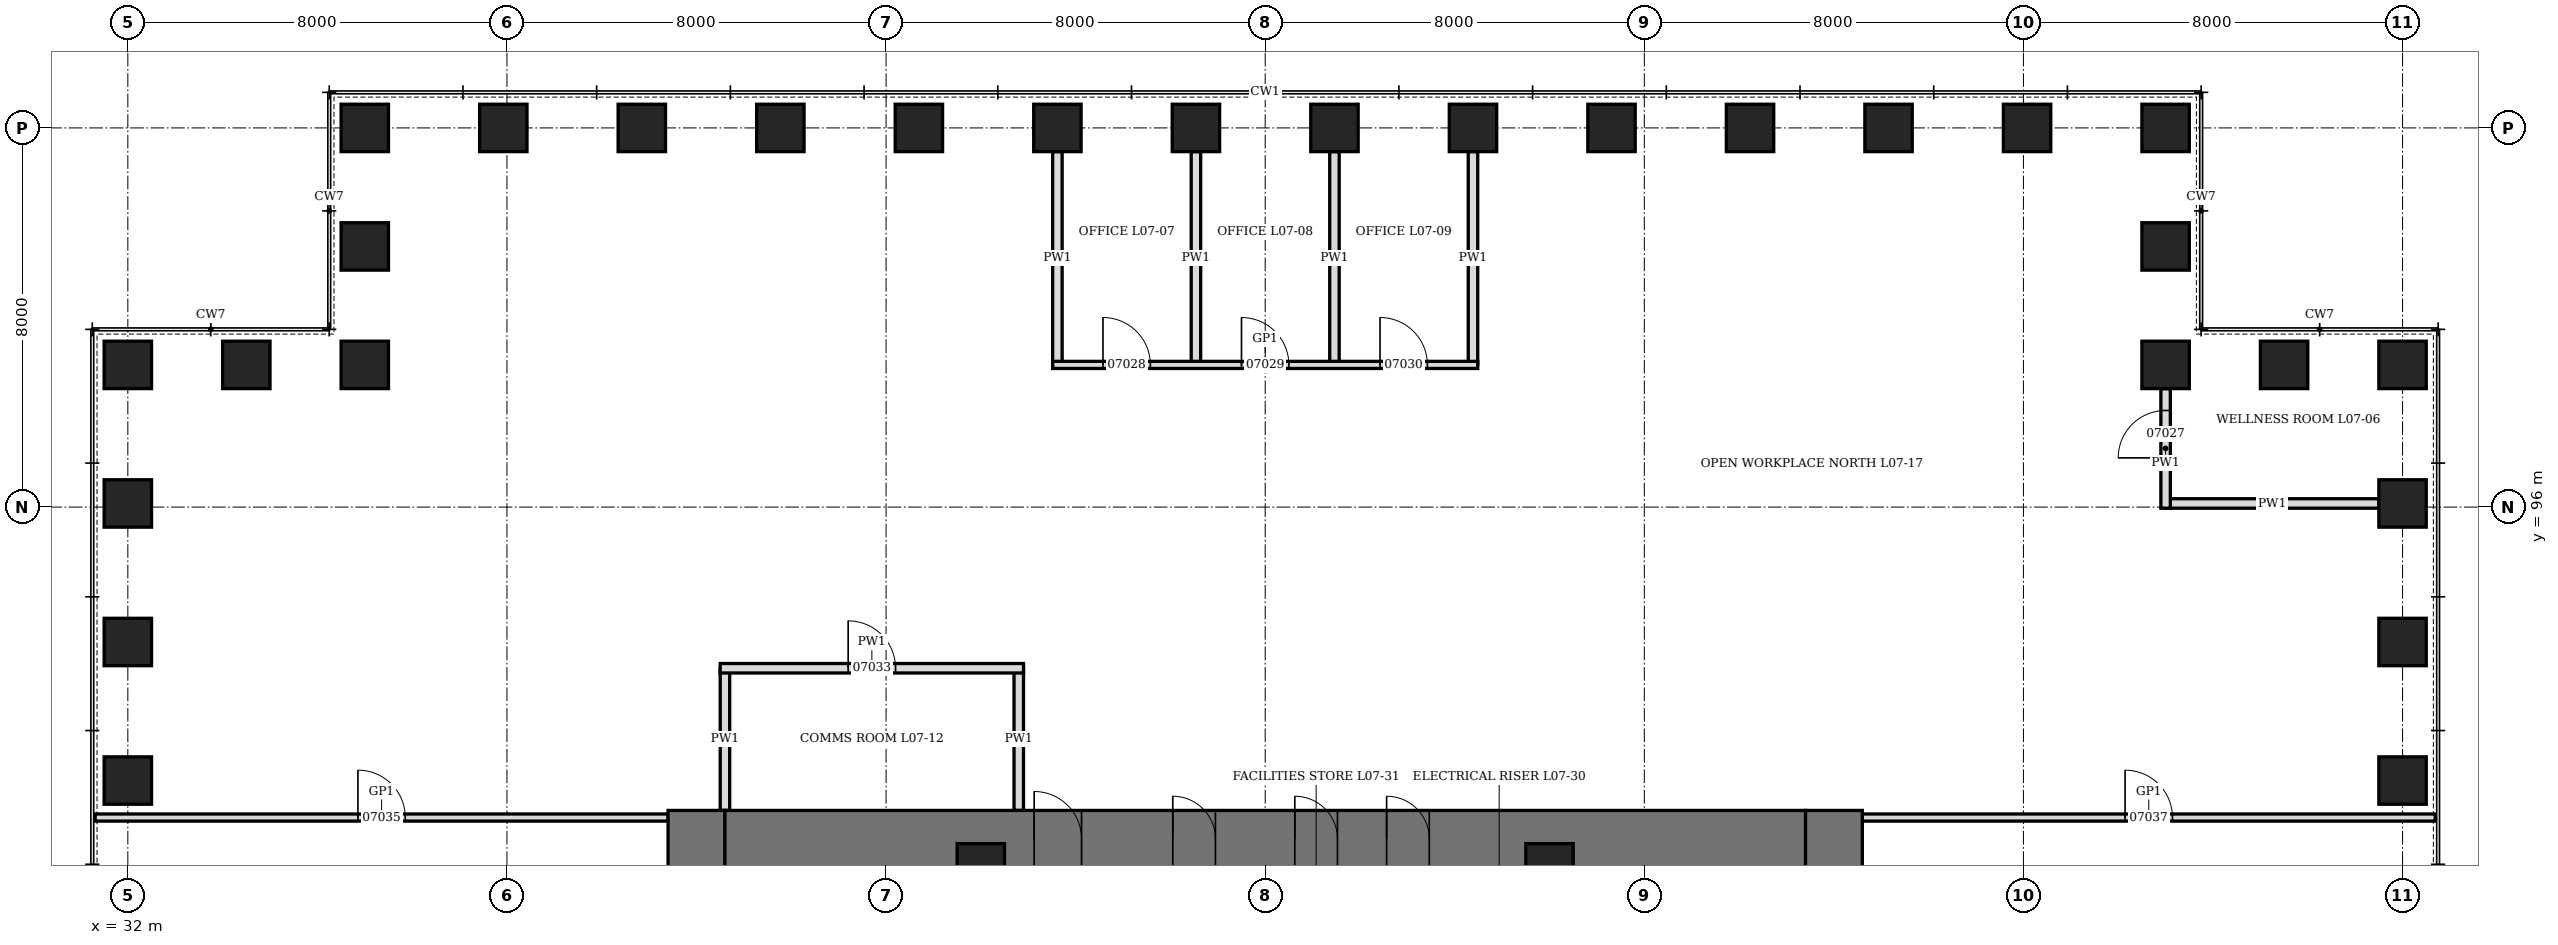
"""IFC4 building model, lengths in metres.
Left out: names, types, materials, properties, quantities, classifications, styles, units other than length and angle.
Written with IfcOpenShell. Run it as: python <this file> out.ifc"""

import sys

from ifc_helpers import new_model, si_unit, direction, frame, frame_2d, origin, origin_2d, place, context, subcontext, project, spatial, rectangle, hollow_rectangle, extrude, element, fill, save


model = new_model("IFC4")
c1 = context("Model", 3, precision=1e-05, world=origin(), true_north=direction((0.0, 1.0)))
c2 = subcontext(c1, "Body", "Model", "MODEL_VIEW")
j1 = project(units=[si_unit("LENGTHUNIT", "METRE"), si_unit("PLANEANGLEUNIT", "RADIAN")], contexts=[c1])
p1 = place(None, origin())
s1 = spatial("IfcSite", under=j1, at=p1, CompositionType="ELEMENT")
p2 = place(p1, origin())
s2 = spatial("IfcBuilding", under=s1, at=p2, CompositionType="ELEMENT")
p3 = place(p2, frame((0.0, 0.0, 39.1)))
s3 = spatial("IfcBuildingStorey", under=s2, at=p3, CompositionType="ELEMENT", Elevation=39.1)
for number, where, z_axis, x_axis in (
    (1, (80.0, 90.231, 0.0), (0.0, 0.0, 1.0), (0.0, 1.0, 0.0)),
    (2, (80.0, 93.154, 0.0), (0.0, 0.0, 1.0), (0.0, 1.0, 0.0)),
    (3, (80.0, 96.077, 0.0), (0.0, 0.0, 1.0), (0.0, 1.0, 0.0)),
    (4, (80.0, 99.0, 0.0), (0.0, 0.0, 1.0), (1.0, 0.0, 0.0)),
    (5, (77.5, 99.0, 0.0), (0.0, 0.0, 1.0), (1.0, 0.0, 0.0)),
    (6, (75.0, 99.0, 0.0), (0.0, 0.0, 1.0), (0.0, 1.0, 0.0)),
    (7, (75.0, 101.5, 0.0), (0.0, 0.0, 1.0), (0.0, 1.0, 0.0)),
    (8, (75.0, 104.0, 0.0), (0.0, 0.0, 1.0), (1.0, 0.0, 0.0)),
    (9, (72.077, 104.0, 0.0), (0.0, 0.0, 1.0), (1.0, 0.0, 0.0)),
    (10, (69.154, 104.0, 0.0), (0.0, 0.0, 1.0), (1.0, 0.0, 0.0)),
    (11, (66.231, 104.0, 0.0), (0.0, 0.0, 1.0), (1.0, 0.0, 0.0)),
    (12, (63.308, 104.0, 0.0), (0.0, 0.0, 1.0), (1.0, 0.0, 0.0)),
    (13, (60.385, 104.0, 0.0), (0.0, 0.0, 1.0), (1.0, 0.0, 0.0)),
    (14, (57.461, 104.0, 0.0), (0.0, 0.0, 1.0), (1.0, 0.0, 0.0)),
    (15, (54.539, 104.0, 0.0), (0.0, 0.0, 1.0), (1.0, 0.0, 0.0)),
    (16, (51.615, 104.0, 0.0), (0.0, 0.0, 1.0), (1.0, 0.0, 0.0)),
    (17, (48.692, 104.0, 0.0), (0.0, 0.0, 1.0), (1.0, 0.0, 0.0)),
    (18, (45.769, 104.0, 0.0), (0.0, 0.0, 1.0), (1.0, 0.0, 0.0)),
    (19, (42.846, 104.0, 0.0), (0.0, 0.0, 1.0), (1.0, 0.0, 0.0)),
    (20, (39.923, 104.0, 0.0), (0.0, 0.0, 1.0), (1.0, 0.0, 0.0)),
    (21, (37.0, 104.0, 0.0), (0.0, 0.0, 1.0), (0.0, 1.0, 0.0)),
    (22, (37.0, 101.5, 0.0), (0.0, 0.0, 1.0), (0.0, 1.0, 0.0)),
    (23, (37.0, 99.0, 0.0), (0.0, 0.0, 1.0), (1.0, 0.0, 0.0)),
    (24, (34.5, 99.0, 0.0), (0.0, 0.0, 1.0), (1.0, 0.0, 0.0)),
    (25, (32.0, 99.0, 0.0), (0.0, 0.0, 1.0), (0.0, 1.0, 0.0)),
    (26, (32.0, 96.077, 0.0), (0.0, 0.0, 1.0), (0.0, 1.0, 0.0)),
    (27, (32.0, 93.154, 0.0), (0.0, 0.0, 1.0), (0.0, 1.0, 0.0)),
    (28, (32.0, 90.231, 0.0), (0.0, 0.0, 1.0), (0.0, 1.0, 0.0)),
):
    element("IfcColumn", number, at=place(p3, frame(where, z_axis=z_axis, x_axis=x_axis)), inside=s3, PredefinedType="COLUMN", context=c2, shape_type="SweptSolid", body=[
        extrude(hollow_rectangle(XDim=1.0, YDim=1.0, WallThickness=0.35, at=origin_2d()), origin(), (0.0, 0.0, 1.0), 4.2),
    ])
p4 = place(p3, frame((44.0, 70.4, 0.0), z_axis=(0.0, 0.0, 1.0), x_axis=(0.0, 1.0, 0.0)))
e29 = element("IfcWall", 29, at=p4, inside=s3, PredefinedType="SHEAR", context=c2, shape_type="SweptSolid", body=[
    extrude(rectangle(XDim=19.2, YDim=1.2, at=frame_2d((9.6, 0.0))), origin(), (0.0, 0.0, 1.0), 4.2),
])
p5 = place(p4, frame((8.6, 0.0, 0.0)))
e30 = element("IfcOpeningElement", 30, at=p5, cuts=e29, PredefinedType="OPENING", context=c2, shape_type="SweptSolid", body=[
    extrude(rectangle(XDim=2.0, YDim=2.4, at=frame_2d((1.0, 1.2))), frame((0.0, 0.61, 0.0), z_axis=(0.0, -1.0, 0.0), x_axis=(1.0, 0.0, 0.0)), (0.0, 0.0, 1.0), 1.22),
])
p6 = place(p3, frame((68.0, 70.4, 0.0), z_axis=(0.0, 0.0, 1.0), x_axis=(0.0, 1.0, 0.0)))
e31 = element("IfcWall", 31, at=p6, inside=s3, PredefinedType="SHEAR", context=c2, shape_type="SweptSolid", body=[
    extrude(rectangle(XDim=19.2, YDim=1.2, at=frame_2d((9.6, 0.0))), origin(), (0.0, 0.0, 1.0), 4.2),
])
p7 = place(p6, frame((8.6, 0.0, 0.0)))
e32 = element("IfcOpeningElement", 32, at=p7, cuts=e31, PredefinedType="OPENING", context=c2, shape_type="SweptSolid", body=[
    extrude(rectangle(XDim=2.0, YDim=2.4, at=frame_2d((1.0, 1.2))), frame((0.0, 0.61, 0.0), z_axis=(0.0, -1.0, 0.0), x_axis=(1.0, 0.0, 0.0)), (0.0, 0.0, 1.0), 1.22),
])
p8 = place(p3, frame((44.6, 89.0, 0.0), z_axis=(0.0, 0.0, 1.0), x_axis=(1.0, 0.0, 0.0)))
e33 = element("IfcWall", 33, at=p8, inside=s3, PredefinedType="SHEAR", context=c2, shape_type="SweptSolid", body=[
    extrude(rectangle(XDim=22.8, YDim=1.2, at=frame_2d((11.4, 0.0))), origin(), (0.0, 0.0, 1.0), 4.2),
])
p9 = place(p8, frame((6.525, 0.0, 0.0)))
e34 = element("IfcOpeningElement", 34, at=p9, cuts=e33, PredefinedType="OPENING", context=c2, shape_type="SweptSolid", body=[
    extrude(rectangle(XDim=1.0, YDim=2.1, at=frame_2d((0.5, 1.05))), frame((0.0, 0.61, 0.0), z_axis=(0.0, -1.0, 0.0), x_axis=(1.0, 0.0, 0.0)), (0.0, 0.0, 1.0), 1.22),
])
p10 = place(p8, frame((9.45, 0.0, 0.0)))
e35 = element("IfcOpeningElement", 35, at=p10, cuts=e33, PredefinedType="OPENING", context=c2, shape_type="SweptSolid", body=[
    extrude(rectangle(XDim=0.9, YDim=2.1, at=frame_2d((0.45, 1.05))), frame((0.0, 0.61, 0.0), z_axis=(0.0, -1.0, 0.0), x_axis=(1.0, 0.0, 0.0)), (0.0, 0.0, 1.0), 1.22),
])
p11 = place(p8, frame((12.025, 0.0, 0.0)))
e36 = element("IfcOpeningElement", 36, at=p11, cuts=e33, PredefinedType="OPENING", context=c2, shape_type="SweptSolid", body=[
    extrude(rectangle(XDim=0.9, YDim=2.1, at=frame_2d((0.45, 1.05))), frame((0.0, 0.61, 0.0), z_axis=(0.0, -1.0, 0.0), x_axis=(1.0, 0.0, 0.0)), (0.0, 0.0, 1.0), 1.22),
])
p12 = place(p8, frame((13.962, 0.0, 0.0)))
e37 = element("IfcOpeningElement", 37, at=p12, cuts=e33, PredefinedType="OPENING", context=c2, shape_type="SweptSolid", body=[
    extrude(rectangle(XDim=0.9, YDim=2.1, at=frame_2d((0.45, 1.05))), frame((0.0, 0.61, 0.0), z_axis=(0.0, -1.0, 0.0), x_axis=(1.0, 0.0, 0.0)), (0.0, 0.0, 1.0), 1.22),
])
for number, where, z_axis, x_axis in (
    (38, (50.0, 88.4, 0.0), (0.0, 0.0, 1.0), (1.0, 0.0, 0.0)),
    (39, (62.0, 88.4, 0.0), (0.0, 0.0, 1.0), (1.0, 0.0, 0.0)),
):
    element("IfcColumn", number, at=place(p3, frame(where, z_axis=z_axis, x_axis=x_axis)), inside=s3, PredefinedType="COLUMN", context=c2, shape_type="SweptSolid", body=[
        extrude(hollow_rectangle(XDim=1.0, YDim=1.0, WallThickness=0.15, at=origin_2d()), origin(), (0.0, 0.0, 1.0), 4.2),
    ])
p13 = place(p3, frame((75.0, 96.077, 0.0), z_axis=(0.0, 0.0, 1.0), x_axis=(1.0, 0.0, 0.0)))
e40 = element("IfcWall", 40, at=p13, inside=s3, PredefinedType="PARTITIONING", context=c2, shape_type="SweptSolid", body=[
    extrude(rectangle(XDim=4.5, YDim=0.2, at=frame_2d((2.25, 0.0))), origin(), (0.0, 0.0, 1.0), 3.428),
])
for number, where, z_axis, x_axis in (
    (41, (51.615, 99.0, 0.0), (0.0, 0.0, 1.0), (0.0, 1.0, 0.0)),
    (42, (54.539, 99.0, 0.0), (0.0, 0.0, 1.0), (0.0, 1.0, 0.0)),
    (43, (57.461, 99.0, 0.0), (0.0, 0.0, 1.0), (0.0, 1.0, 0.0)),
    (44, (60.385, 99.0, 0.0), (0.0, 0.0, 1.0), (0.0, 1.0, 0.0)),
):
    element("IfcWall", number, at=place(p3, frame(where, z_axis=z_axis, x_axis=x_axis)), inside=s3, PredefinedType="PARTITIONING", context=c2, shape_type="SweptSolid", body=[
        extrude(rectangle(XDim=4.5, YDim=0.2, at=frame_2d((2.25, 0.0))), origin(), (0.0, 0.0, 1.0), 3.278),
    ])
for number, where, z_axis, x_axis in (
    (45, (44.6, 89.6, 0.0), (0.0, 0.0, 1.0), (0.0, 1.0, 0.0)),
    (46, (50.8, 89.6, 0.0), (0.0, 0.0, 1.0), (0.0, 1.0, 0.0)),
):
    element("IfcWall", number, at=place(p3, frame(where, z_axis=z_axis, x_axis=x_axis)), inside=s3, PredefinedType="PARTITIONING", context=c2, shape_type="SweptSolid", body=[
        extrude(rectangle(XDim=3.0, YDim=0.2, at=frame_2d((1.5, 0.0))), origin(), (0.0, 0.0, 1.0), 4.04),
    ])
p14 = place(p3, frame((31.31, 89.45, 0.0), z_axis=(0.0, 0.0, 1.0), x_axis=(1.0, 0.0, 0.0)))
e47 = element("IfcWall", 47, at=p14, inside=s3, PredefinedType="PARTITIONING", context=c2, shape_type="SweptSolid", body=[
    extrude(rectangle(XDim=12.09, YDim=0.15, at=frame_2d((6.045, 0.0))), origin(), (0.0, 0.0, 1.0), 4.04),
])
p15 = place(p14, frame((5.545, 0.0, 0.0)))
e48 = element("IfcOpeningElement", 48, at=p15, cuts=e47, PredefinedType="OPENING", context=c2, shape_type="SweptSolid", body=[
    extrude(rectangle(XDim=1.0, YDim=2.4, at=frame_2d((0.5, 1.2))), frame((0.0, 0.085, 0.0), z_axis=(0.0, -1.0, 0.0), x_axis=(1.0, 0.0, 0.0)), (0.0, 0.0, 1.0), 0.17),
])
p16 = place(p3, frame((68.6, 89.45, 0.0), z_axis=(0.0, 0.0, 1.0), x_axis=(1.0, 0.0, 0.0)))
e49 = element("IfcWall", 49, at=p16, inside=s3, PredefinedType="PARTITIONING", context=c2, shape_type="SweptSolid", body=[
    extrude(rectangle(XDim=12.09, YDim=0.15, at=frame_2d((6.045, 0.0))), origin(), (0.0, 0.0, 1.0), 4.04),
])
p17 = place(p16, frame((5.545, 0.0, 0.0)))
e50 = element("IfcOpeningElement", 50, at=p17, cuts=e49, PredefinedType="OPENING", context=c2, shape_type="SweptSolid", body=[
    extrude(rectangle(XDim=1.0, YDim=2.4, at=frame_2d((0.5, 1.2))), frame((0.0, 0.085, 0.0), z_axis=(0.0, -1.0, 0.0), x_axis=(1.0, 0.0, 0.0)), (0.0, 0.0, 1.0), 0.17),
])
p18 = place(p3, frame((44.5, 92.6, 0.0), z_axis=(0.0, 0.0, 1.0), x_axis=(1.0, 0.0, 0.0)))
e51 = element("IfcWall", 51, at=p18, inside=s3, PredefinedType="PARTITIONING", context=c2, shape_type="SweptSolid", body=[
    extrude(rectangle(XDim=6.4, YDim=0.2, at=frame_2d((3.2, 0.0))), origin(), (0.0, 0.0, 1.0), 4.04),
])
p19 = place(p18, frame((2.7, 0.0, 0.0)))
e52 = element("IfcOpeningElement", 52, at=p19, cuts=e51, PredefinedType="OPENING", context=c2, shape_type="SweptSolid", body=[
    extrude(rectangle(XDim=1.0, YDim=2.1, at=frame_2d((0.5, 1.05))), frame((0.0, 0.11, 0.0), z_axis=(0.0, -1.0, 0.0), x_axis=(1.0, 0.0, 0.0)), (0.0, 0.0, 1.0), 0.22),
])
p20 = place(p3, frame((51.515, 99.0, 0.0), z_axis=(0.0, 0.0, 1.0), x_axis=(1.0, 0.0, 0.0)))
e53 = element("IfcWall", 53, at=p20, inside=s3, PredefinedType="PARTITIONING", context=c2, shape_type="SweptSolid", body=[
    extrude(rectangle(XDim=8.969, YDim=0.15, at=frame_2d((4.485, 0.0))), origin(), (0.0, 0.0, 1.0), 4.04),
])
p21 = place(p20, frame((1.062, 0.0, 0.0)))
e54 = element("IfcOpeningElement", 54, at=p21, cuts=e53, PredefinedType="OPENING", context=c2, shape_type="SweptSolid", body=[
    extrude(rectangle(XDim=1.0, YDim=2.1, at=frame_2d((0.5, 1.05))), frame((0.0, 0.085, 0.0), z_axis=(0.0, -1.0, 0.0), x_axis=(1.0, 0.0, 0.0)), (0.0, 0.0, 1.0), 0.17),
])
p22 = place(p20, frame((3.985, 0.0, 0.0)))
e55 = element("IfcOpeningElement", 55, at=p22, cuts=e53, PredefinedType="OPENING", context=c2, shape_type="SweptSolid", body=[
    extrude(rectangle(XDim=1.0, YDim=2.1, at=frame_2d((0.5, 1.05))), frame((0.0, 0.085, 0.0), z_axis=(0.0, -1.0, 0.0), x_axis=(1.0, 0.0, 0.0)), (0.0, 0.0, 1.0), 0.17),
])
p23 = place(p20, frame((6.908, 0.0, 0.0)))
e56 = element("IfcOpeningElement", 56, at=p23, cuts=e53, PredefinedType="OPENING", context=c2, shape_type="SweptSolid", body=[
    extrude(rectangle(XDim=1.0, YDim=2.1, at=frame_2d((0.5, 1.05))), frame((0.0, 0.085, 0.0), z_axis=(0.0, -1.0, 0.0), x_axis=(1.0, 0.0, 0.0)), (0.0, 0.0, 1.0), 0.17),
])
p24 = place(p3, frame((75.0, 95.977, 0.0), z_axis=(0.0, 0.0, 1.0), x_axis=(0.0, 1.0, 0.0)))
e57 = element("IfcWall", 57, at=p24, inside=s3, PredefinedType="PARTITIONING", context=c2, shape_type="SweptSolid", body=[
    extrude(rectangle(XDim=2.523, YDim=0.2, at=frame_2d((1.262, 0.0))), origin(), (0.0, 0.0, 1.0), 4.04),
])
p25 = place(p24, frame((1.062, 0.0, 0.0)))
e58 = element("IfcOpeningElement", 58, at=p25, cuts=e57, PredefinedType="OPENING", context=c2, shape_type="SweptSolid", body=[
    extrude(rectangle(XDim=1.0, YDim=2.1, at=frame_2d((0.5, 1.05))), frame((0.0, 0.11, 0.0), z_axis=(0.0, -1.0, 0.0), x_axis=(1.0, 0.0, 0.0)), (0.0, 0.0, 1.0), 0.22),
])
p26 = place(p9, origin())
e59 = element("IfcDoor", 59, at=p26, inside=s3, OperationType="SINGLE_SWING_LEFT", PredefinedType="DOOR", context=c2, shape_type="SweptSolid", body=[
    extrude(rectangle(XDim=1.0, YDim=2.1, at=frame_2d((0.5, 1.05))), frame((0.0, 0.35, 0.0), z_axis=(0.0, -1.0, 0.0), x_axis=(1.0, 0.0, 0.0)), (0.0, 0.0, 1.0), 0.7),
])
fill(e34, e59)
p27 = place(p10, origin())
e60 = element("IfcDoor", 60, at=p27, inside=s3, OperationType="SINGLE_SWING_LEFT", PredefinedType="DOOR", context=c2, shape_type="SweptSolid", body=[
    extrude(rectangle(XDim=0.9, YDim=2.1, at=frame_2d((0.45, 1.05))), frame((0.0, 0.35, 0.0), z_axis=(0.0, -1.0, 0.0), x_axis=(1.0, 0.0, 0.0)), (0.0, 0.0, 1.0), 0.7),
])
fill(e35, e60)
p28 = place(p11, origin())
e61 = element("IfcDoor", 61, at=p28, inside=s3, OperationType="SINGLE_SWING_LEFT", PredefinedType="DOOR", context=c2, shape_type="SweptSolid", body=[
    extrude(rectangle(XDim=0.9, YDim=2.1, at=frame_2d((0.45, 1.05))), frame((0.0, 0.35, 0.0), z_axis=(0.0, -1.0, 0.0), x_axis=(1.0, 0.0, 0.0)), (0.0, 0.0, 1.0), 0.7),
])
fill(e36, e61)
p29 = place(p12, origin())
e62 = element("IfcDoor", 62, at=p29, inside=s3, OperationType="SINGLE_SWING_LEFT", PredefinedType="DOOR", context=c2, shape_type="SweptSolid", body=[
    extrude(rectangle(XDim=0.9, YDim=2.1, at=frame_2d((0.45, 1.05))), frame((0.0, 0.35, 0.0), z_axis=(0.0, -1.0, 0.0), x_axis=(1.0, 0.0, 0.0)), (0.0, 0.0, 1.0), 0.7),
])
fill(e37, e62)
p30 = place(p25, origin())
e63 = element("IfcDoor", 63, at=p30, inside=s3, OperationType="SINGLE_SWING_LEFT", PredefinedType="DOOR", context=c2, shape_type="SweptSolid", body=[
    extrude(rectangle(XDim=1.0, YDim=2.1, at=frame_2d((0.5, 1.05))), frame((0.0, 0.1, 0.0), z_axis=(0.0, -1.0, 0.0), x_axis=(1.0, 0.0, 0.0)), (0.0, 0.0, 1.0), 0.199),
])
fill(e58, e63)
p31 = place(p21, origin())
e64 = element("IfcDoor", 64, at=p31, inside=s3, OperationType="SINGLE_SWING_LEFT", PredefinedType="DOOR", context=c2, shape_type="SweptSolid", body=[
    extrude(rectangle(XDim=1.0, YDim=2.1, at=frame_2d((0.5, 1.05))), frame((0.0, 0.075, 0.0), z_axis=(0.0, -1.0, 0.0), x_axis=(1.0, 0.0, 0.0)), (0.0, 0.0, 1.0), 0.149),
])
fill(e54, e64)
p32 = place(p22, origin())
e65 = element("IfcDoor", 65, at=p32, inside=s3, OperationType="SINGLE_SWING_LEFT", PredefinedType="DOOR", context=c2, shape_type="SweptSolid", body=[
    extrude(rectangle(XDim=1.0, YDim=2.1, at=frame_2d((0.5, 1.05))), frame((0.0, 0.075, 0.0), z_axis=(0.0, -1.0, 0.0), x_axis=(1.0, 0.0, 0.0)), (0.0, 0.0, 1.0), 0.149),
])
fill(e55, e65)
p33 = place(p23, origin())
e66 = element("IfcDoor", 66, at=p33, inside=s3, OperationType="SINGLE_SWING_LEFT", PredefinedType="DOOR", context=c2, shape_type="SweptSolid", body=[
    extrude(rectangle(XDim=1.0, YDim=2.1, at=frame_2d((0.5, 1.05))), frame((0.0, 0.075, 0.0), z_axis=(0.0, -1.0, 0.0), x_axis=(1.0, 0.0, 0.0)), (0.0, 0.0, 1.0), 0.149),
])
fill(e56, e66)
p34 = place(p19, origin())
e67 = element("IfcDoor", 67, at=p34, inside=s3, OperationType="SINGLE_SWING_LEFT", PredefinedType="DOOR", context=c2, shape_type="SweptSolid", body=[
    extrude(rectangle(XDim=1.0, YDim=2.1, at=frame_2d((0.5, 1.05))), frame((0.0, 0.1, 0.0), z_axis=(0.0, -1.0, 0.0), x_axis=(1.0, 0.0, 0.0)), (0.0, 0.0, 1.0), 0.199),
])
fill(e52, e67)
p35 = place(p15, origin())
e68 = element("IfcDoor", 68, at=p35, inside=s3, OperationType="SINGLE_SWING_RIGHT", PredefinedType="DOOR", context=c2, shape_type="SweptSolid", body=[
    extrude(rectangle(XDim=1.0, YDim=2.4, at=frame_2d((0.5, 1.2))), frame((0.0, 0.075, 0.0), z_axis=(0.0, -1.0, 0.0), x_axis=(1.0, 0.0, 0.0)), (0.0, 0.0, 1.0), 0.149),
])
fill(e48, e68)
p36 = place(p17, origin())
e69 = element("IfcDoor", 69, at=p36, inside=s3, OperationType="SINGLE_SWING_RIGHT", PredefinedType="DOOR", context=c2, shape_type="SweptSolid", body=[
    extrude(rectangle(XDim=1.0, YDim=2.4, at=frame_2d((0.5, 1.2))), frame((0.0, 0.075, 0.0), z_axis=(0.0, -1.0, 0.0), x_axis=(1.0, 0.0, 0.0)), (0.0, 0.0, 1.0), 0.149),
])
fill(e50, e69)
save(model, sys.argv[1])
